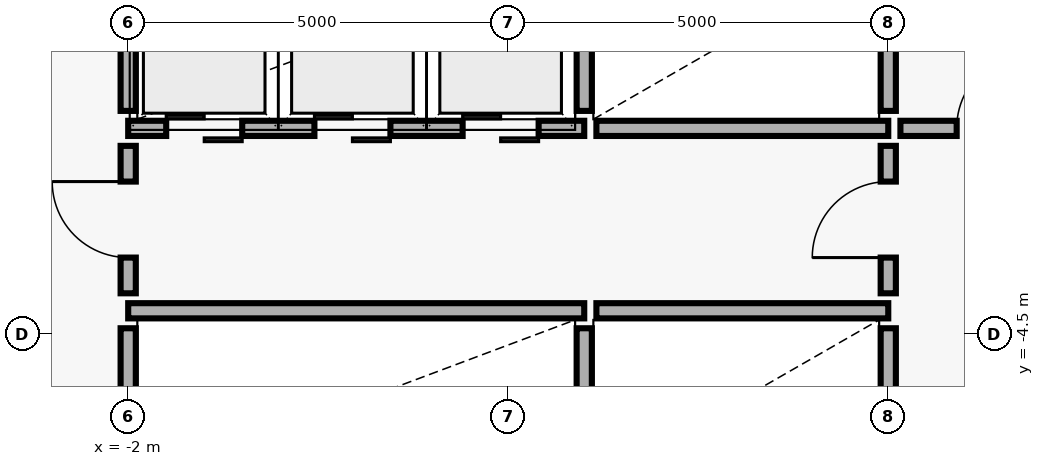
"""IFC4 building model, lengths in metres.
Left out: names, types, materials, properties, quantities, classifications, styles, units other than length and angle.
Written with IfcOpenShell. Run it as: python <this file> out.ifc"""

import sys

from ifc_helpers import new_model, si_unit, direction, frame, frame_2d, origin, place, context, subcontext, project, spatial, rectangle, extrude, element, fill, save


model = new_model("IFC4")
c1 = context("Model", 3, precision=1e-05, world=origin(), true_north=direction((0.0, 1.0)))
c2 = subcontext(c1, "Body", "Model", "MODEL_VIEW")
j1 = project(units=[si_unit("LENGTHUNIT", "METRE"), si_unit("PLANEANGLEUNIT", "RADIAN")], contexts=[c1])
p1 = place(None, origin())
s1 = spatial("IfcSite", under=j1, at=p1, CompositionType="ELEMENT")
p2 = place(p1, origin())
s2 = spatial("IfcBuilding", under=s1, at=p2, CompositionType="ELEMENT")
p3 = place(p2, frame((0.0, 0.0, 62.7)))
s3 = spatial("IfcBuildingStorey", under=s2, at=p3, CompositionType="ELEMENT", Elevation=62.7)
p4 = place(p3, frame((-2.0, -1.8, 0.0), z_axis=(0.0, 0.0, 1.0), x_axis=(1.0, 0.0, 0.0)))
e1 = element("IfcWall", 1, at=p4, inside=s3, PredefinedType="SOLIDWALL", context=c2, shape_type="SweptSolid", body=[
    extrude(rectangle(XDim=6.0, YDim=0.2, at=frame_2d((3.0, 0.0))), origin(), (0.0, 0.0, 1.0), 3.64),
])
p5 = place(p4, frame((0.5, 0.0, 0.0)))
e2 = element("IfcOpeningElement", 2, at=p5, cuts=e1, PredefinedType="OPENING", context=c2, shape_type="SweptSolid", body=[
    extrude(rectangle(XDim=1.0, YDim=2.2, at=frame_2d((0.5, 1.1))), frame((0.0, 0.11, 0.0), z_axis=(0.0, -1.0, 0.0), x_axis=(1.0, 0.0, 0.0)), (0.0, 0.0, 1.0), 0.22),
])
p6 = place(p4, frame((2.45, 0.0, 0.0)))
e3 = element("IfcOpeningElement", 3, at=p6, cuts=e1, PredefinedType="OPENING", context=c2, shape_type="SweptSolid", body=[
    extrude(rectangle(XDim=1.0, YDim=2.2, at=frame_2d((0.5, 1.1))), frame((0.0, 0.11, 0.0), z_axis=(0.0, -1.0, 0.0), x_axis=(1.0, 0.0, 0.0)), (0.0, 0.0, 1.0), 0.22),
])
p7 = place(p4, frame((4.4, 0.0, 0.0)))
e4 = element("IfcOpeningElement", 4, at=p7, cuts=e1, PredefinedType="OPENING", context=c2, shape_type="SweptSolid", body=[
    extrude(rectangle(XDim=1.0, YDim=2.2, at=frame_2d((0.5, 1.1))), frame((0.0, 0.11, 0.0), z_axis=(0.0, -1.0, 0.0), x_axis=(1.0, 0.0, 0.0)), (0.0, 0.0, 1.0), 0.22),
])
p8 = place(p3, frame((-2.0, -1.57, 0.0), z_axis=(0.0, 0.0, 1.0), x_axis=(0.0, 1.0, 0.0)))
e5 = element("IfcWall", 5, at=p8, inside=s3, PredefinedType="SOLIDWALL", context=c2, shape_type="SweptSolid", body=[
    extrude(rectangle(XDim=2.05, YDim=0.2, at=frame_2d((1.025, 0.0))), origin(), (0.0, 0.0, 1.0), 3.022),
])
p9 = place(p3, frame((4.16, -1.8, 0.0), z_axis=(0.0, 0.0, 1.0), x_axis=(1.0, 0.0, 0.0)))
e6 = element("IfcWall", 6, at=p9, inside=s3, PredefinedType="SOLIDWALL", context=c2, shape_type="SweptSolid", body=[
    extrude(rectangle(XDim=3.84, YDim=0.2, at=frame_2d((1.92, 0.0))), origin(), (0.0, 0.0, 1.0), 3.64),
])
p10 = place(p3, frame((4.0, -1.57, 0.0), z_axis=(0.0, 0.0, 1.0), x_axis=(0.0, 1.0, 0.0)))
e7 = element("IfcWall", 7, at=p10, inside=s3, PredefinedType="SOLIDWALL", context=c2, shape_type="SweptSolid", body=[
    extrude(rectangle(XDim=1.94, YDim=0.2, at=frame_2d((0.97, 0.0))), origin(), (0.0, 0.0, 1.0), 3.64),
])
p11 = place(p3, frame((8.0, -1.57, 0.0), z_axis=(0.0, 0.0, 1.0), x_axis=(0.0, 1.0, 0.0)))
e8 = element("IfcWall", 8, at=p11, inside=s3, PredefinedType="SOLIDWALL", context=c2, shape_type="SweptSolid", body=[
    extrude(rectangle(XDim=2.05, YDim=0.2, at=frame_2d((1.025, 0.0))), origin(), (0.0, 0.0, 1.0), 3.072),
])
p12 = place(p3, frame((-2.0, -4.2, 0.0), z_axis=(0.0, 0.0, 1.0), x_axis=(1.0, 0.0, 0.0)))
e9 = element("IfcWall", 9, at=p12, inside=s3, PredefinedType="SOLIDWALL", context=c2, shape_type="SweptSolid", body=[
    extrude(rectangle(XDim=6.0, YDim=0.2, at=frame_2d((3.0, 0.0))), origin(), (0.0, 0.0, 1.0), 3.64),
])
p13 = place(p3, frame((-2.0, -6.37, 0.0), z_axis=(0.0, 0.0, 1.0), x_axis=(0.0, 1.0, 0.0)))
e10 = element("IfcWall", 10, at=p13, inside=s3, PredefinedType="SOLIDWALL", context=c2, shape_type="SweptSolid", body=[
    extrude(rectangle(XDim=1.94, YDim=0.2, at=frame_2d((0.97, 0.0))), origin(), (0.0, 0.0, 1.0), 3.022),
])
p14 = place(p3, frame((4.16, -4.2, 0.0), z_axis=(0.0, 0.0, 1.0), x_axis=(1.0, 0.0, 0.0)))
e11 = element("IfcWall", 11, at=p14, inside=s3, PredefinedType="SOLIDWALL", context=c2, shape_type="SweptSolid", body=[
    extrude(rectangle(XDim=3.84, YDim=0.2, at=frame_2d((1.92, 0.0))), origin(), (0.0, 0.0, 1.0), 3.64),
])
p15 = place(p3, frame((4.0, -6.37, 0.0), z_axis=(0.0, 0.0, 1.0), x_axis=(0.0, 1.0, 0.0)))
e12 = element("IfcWall", 12, at=p15, inside=s3, PredefinedType="SOLIDWALL", context=c2, shape_type="SweptSolid", body=[
    extrude(rectangle(XDim=1.94, YDim=0.2, at=frame_2d((0.97, 0.0))), origin(), (0.0, 0.0, 1.0), 3.64),
])
p16 = place(p3, frame((8.0, -6.37, 0.0), z_axis=(0.0, 0.0, 1.0), x_axis=(0.0, 1.0, 0.0)))
e13 = element("IfcWall", 13, at=p16, inside=s3, PredefinedType="SOLIDWALL", context=c2, shape_type="SweptSolid", body=[
    extrude(rectangle(XDim=1.94, YDim=0.2, at=frame_2d((0.97, 0.0))), origin(), (0.0, 0.0, 1.0), 3.072),
])
p17 = place(p3, frame((-2.0, -3.97, 0.0), z_axis=(0.0, 0.0, 1.0), x_axis=(0.0, 1.0, 0.0)))
e14 = element("IfcWall", 14, at=p17, inside=s3, PredefinedType="MOVABLE", context=c2, shape_type="SweptSolid", body=[
    extrude(rectangle(XDim=1.94, YDim=0.2, at=frame_2d((0.97, 0.0))), origin(), (0.0, 0.0, 1.0), 3.022),
])
p18 = place(p17, frame((0.47, 0.0, 0.0)))
e15 = element("IfcOpeningElement", 15, at=p18, cuts=e14, PredefinedType="OPENING", context=c2, shape_type="SweptSolid", body=[
    extrude(rectangle(XDim=1.0, YDim=2.1, at=frame_2d((0.5, 1.05))), frame((0.0, 0.11, 0.0), z_axis=(0.0, -1.0, 0.0), x_axis=(1.0, 0.0, 0.0)), (0.0, 0.0, 1.0), 0.22),
])
p19 = place(p3, frame((8.0, -3.97, 0.0), z_axis=(0.0, 0.0, 1.0), x_axis=(0.0, 1.0, 0.0)))
e16 = element("IfcWall", 16, at=p19, inside=s3, PredefinedType="MOVABLE", context=c2, shape_type="SweptSolid", body=[
    extrude(rectangle(XDim=1.94, YDim=0.2, at=frame_2d((0.97, 0.0))), origin(), (0.0, 0.0, 1.0), 3.072),
])
p20 = place(p19, frame((0.47, 0.0, 0.0)))
e17 = element("IfcOpeningElement", 17, at=p20, cuts=e16, PredefinedType="OPENING", context=c2, shape_type="SweptSolid", body=[
    extrude(rectangle(XDim=1.0, YDim=2.1, at=frame_2d((0.5, 1.05))), frame((0.0, 0.11, 0.0), z_axis=(0.0, -1.0, 0.0), x_axis=(1.0, 0.0, 0.0)), (0.0, 0.0, 1.0), 0.22),
])
p21 = place(p3, frame((8.16, -1.8, 0.0), z_axis=(0.0, 0.0, 1.0), x_axis=(1.0, 0.0, 0.0)))
e18 = element("IfcWall", 18, at=p21, inside=s3, PredefinedType="MOVABLE", context=c2, shape_type="SweptSolid", body=[
    extrude(rectangle(XDim=2.64, YDim=0.2, at=frame_2d((1.32, 0.0))), origin(), (0.0, 0.0, 1.0), 3.64),
])
p22 = place(p21, frame((0.74, 0.0, 0.0)))
e19 = element("IfcOpeningElement", 19, at=p22, cuts=e18, PredefinedType="OPENING", context=c2, shape_type="SweptSolid", body=[
    extrude(rectangle(XDim=1.0, YDim=2.1, at=frame_2d((0.5, 1.05))), frame((0.0, 0.11, 0.0), z_axis=(0.0, -1.0, 0.0), x_axis=(1.0, 0.0, 0.0)), (0.0, 0.0, 1.0), 0.22),
])
p23 = place(p18, origin())
e20 = element("IfcDoor", 20, at=p23, inside=s3, OperationType="SINGLE_SWING_RIGHT", PredefinedType="DOOR", context=c2, shape_type="SweptSolid", body=[
    extrude(rectangle(XDim=1.0, YDim=2.1, at=frame_2d((0.5, 1.05))), frame((0.0, 0.025, 0.0), z_axis=(0.0, -1.0, 0.0), x_axis=(1.0, 0.0, 0.0)), (0.0, 0.0, 1.0), 0.05),
])
fill(e15, e20)
p24 = place(p20, origin())
e21 = element("IfcDoor", 21, at=p24, inside=s3, OperationType="SINGLE_SWING_LEFT", PredefinedType="DOOR", context=c2, shape_type="SweptSolid", body=[
    extrude(rectangle(XDim=1.0, YDim=2.1, at=frame_2d((0.5, 1.05))), frame((0.0, 0.025, 0.0), z_axis=(0.0, -1.0, 0.0), x_axis=(1.0, 0.0, 0.0)), (0.0, 0.0, 1.0), 0.05),
])
fill(e17, e21)
p25 = place(p22, origin())
e22 = element("IfcDoor", 22, at=p25, inside=s3, OperationType="SINGLE_SWING_RIGHT", PredefinedType="DOOR", context=c2, shape_type="SweptSolid", body=[
    extrude(rectangle(XDim=1.0, YDim=2.1, at=frame_2d((0.5, 1.05))), frame((0.0, 0.025, 0.0), z_axis=(0.0, -1.0, 0.0), x_axis=(1.0, 0.0, 0.0)), (0.0, 0.0, 1.0), 0.05),
])
fill(e19, e22)
p26 = place(p5, origin())
e23 = element("IfcDoor", 23, at=p26, inside=s3, OperationType="DOUBLE_DOOR_SLIDING", PredefinedType="DOOR", context=c2, shape_type="SweptSolid", body=[
    extrude(rectangle(XDim=1.0, YDim=2.2, at=frame_2d((0.5, 1.1))), frame((0.0, 0.025, 0.0), z_axis=(0.0, -1.0, 0.0), x_axis=(1.0, 0.0, 0.0)), (0.0, 0.0, 1.0), 0.05),
])
fill(e2, e23)
p27 = place(p6, origin())
e24 = element("IfcDoor", 24, at=p27, inside=s3, OperationType="DOUBLE_DOOR_SLIDING", PredefinedType="DOOR", context=c2, shape_type="SweptSolid", body=[
    extrude(rectangle(XDim=1.0, YDim=2.2, at=frame_2d((0.5, 1.1))), frame((0.0, 0.025, 0.0), z_axis=(0.0, -1.0, 0.0), x_axis=(1.0, 0.0, 0.0)), (0.0, 0.0, 1.0), 0.05),
])
fill(e3, e24)
p28 = place(p7, origin())
e25 = element("IfcDoor", 25, at=p28, inside=s3, OperationType="DOUBLE_DOOR_SLIDING", PredefinedType="DOOR", context=c2, shape_type="SweptSolid", body=[
    extrude(rectangle(XDim=1.0, YDim=2.2, at=frame_2d((0.5, 1.1))), frame((0.0, 0.025, 0.0), z_axis=(0.0, -1.0, 0.0), x_axis=(1.0, 0.0, 0.0)), (0.0, 0.0, 1.0), 0.05),
])
fill(e4, e25)
save(model, sys.argv[1])
